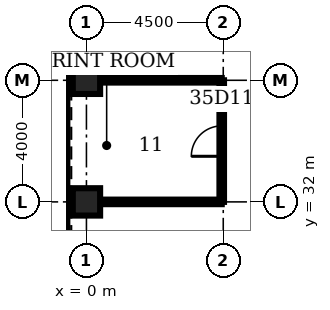
"""IFC4 building model, lengths in metres.
Left out: names, types, materials, properties, quantities, classifications, styles, units other than length and angle.
Written with IfcOpenShell. Run it as: python <this file> out.ifc"""

import sys

from ifc_helpers import new_model, si_unit, direction, frame, frame_2d, origin, origin_2d, place, context, subcontext, project, spatial, rectangle, hollow_rectangle, extrude, element, fill, save


model = new_model("IFC4")
c1 = context("Model", 3, precision=1e-05, world=origin(), true_north=direction((0.0, 1.0)))
c2 = subcontext(c1, "Body", "Model", "MODEL_VIEW")
j1 = project(units=[si_unit("LENGTHUNIT", "METRE"), si_unit("PLANEANGLEUNIT", "RADIAN")], contexts=[c1])
p1 = place(None, origin())
s1 = spatial("IfcSite", under=j1, at=p1, CompositionType="ELEMENT")
p2 = place(p1, origin())
s2 = spatial("IfcBuilding", under=s1, at=p2, CompositionType="ELEMENT")
p3 = place(p2, frame((0.0, 0.0, 159.3)))
s3 = spatial("IfcBuildingStorey", under=s2, at=p3, CompositionType="ELEMENT", Elevation=159.3)
for number, where, z_axis, x_axis in (
    (1, (0.0, 36.0, 0.0), (0.0, 0.0, 1.0), (1.0, 0.0, 0.0)),
    (2, (0.0, 32.0, 0.0), (0.0, 0.0, 1.0), (1.0, 0.0, 0.0)),
):
    element("IfcColumn", number, at=place(p3, frame(where, z_axis=z_axis, x_axis=x_axis)), inside=s3, PredefinedType="COLUMN", context=c2, shape_type="SweptSolid", body=[
        extrude(hollow_rectangle(XDim=0.9, YDim=0.9, WallThickness=0.1, at=origin_2d()), origin(), (0.0, 0.0, 1.0), 4.2),
    ])
for number, where, z_axis, x_axis in (
    (3, (0.45, 32.0, 0.0), (0.0, 0.0, 1.0), (1.0, 0.0, 0.0)),
    (4, (0.45, 36.0, 0.0), (0.0, 0.0, 1.0), (1.0, 0.0, 0.0)),
):
    element("IfcWall", number, at=place(p3, frame(where, z_axis=z_axis, x_axis=x_axis)), inside=s3, PredefinedType="PARTITIONING", context=c2, shape_type="SweptSolid", body=[
        extrude(rectangle(XDim=4.0, YDim=0.15, at=frame_2d((2.0, 0.0))), origin(), (0.0, 0.0, 1.0), 3.0),
    ])
p4 = place(p3, frame((4.45, 32.0, 0.0), z_axis=(0.0, 0.0, 1.0), x_axis=(0.0, 1.0, 0.0)))
e5 = element("IfcWall", 5, at=p4, inside=s3, PredefinedType="PARTITIONING", context=c2, shape_type="SweptSolid", body=[
    extrude(rectangle(XDim=4.0, YDim=0.15, at=frame_2d((2.0, 0.0))), origin(), (0.0, 0.0, 1.0), 3.0),
])
p5 = place(p4, frame((1.5, 0.0, 0.0)))
e6 = element("IfcOpeningElement", 6, at=p5, cuts=e5, PredefinedType="OPENING", context=c2, shape_type="SweptSolid", body=[
    extrude(rectangle(XDim=1.0, YDim=2.1, at=frame_2d((0.5, 1.05))), frame((0.0, 0.085, 0.0), z_axis=(0.0, -1.0, 0.0), x_axis=(1.0, 0.0, 0.0)), (0.0, 0.0, 1.0), 0.17),
])
p6 = place(p5, origin())
e7 = element("IfcDoor", 7, at=p6, inside=s3, OperationType="SINGLE_SWING_LEFT", PredefinedType="DOOR", context=c2, shape_type="SweptSolid", body=[
    extrude(rectangle(XDim=1.0, YDim=2.1, at=frame_2d((0.5, 1.05))), frame((0.0, 0.025, 0.0), z_axis=(0.0, -1.0, 0.0), x_axis=(1.0, 0.0, 0.0)), (0.0, 0.0, 1.0), 0.05),
])
fill(e6, e7)
save(model, sys.argv[1])
